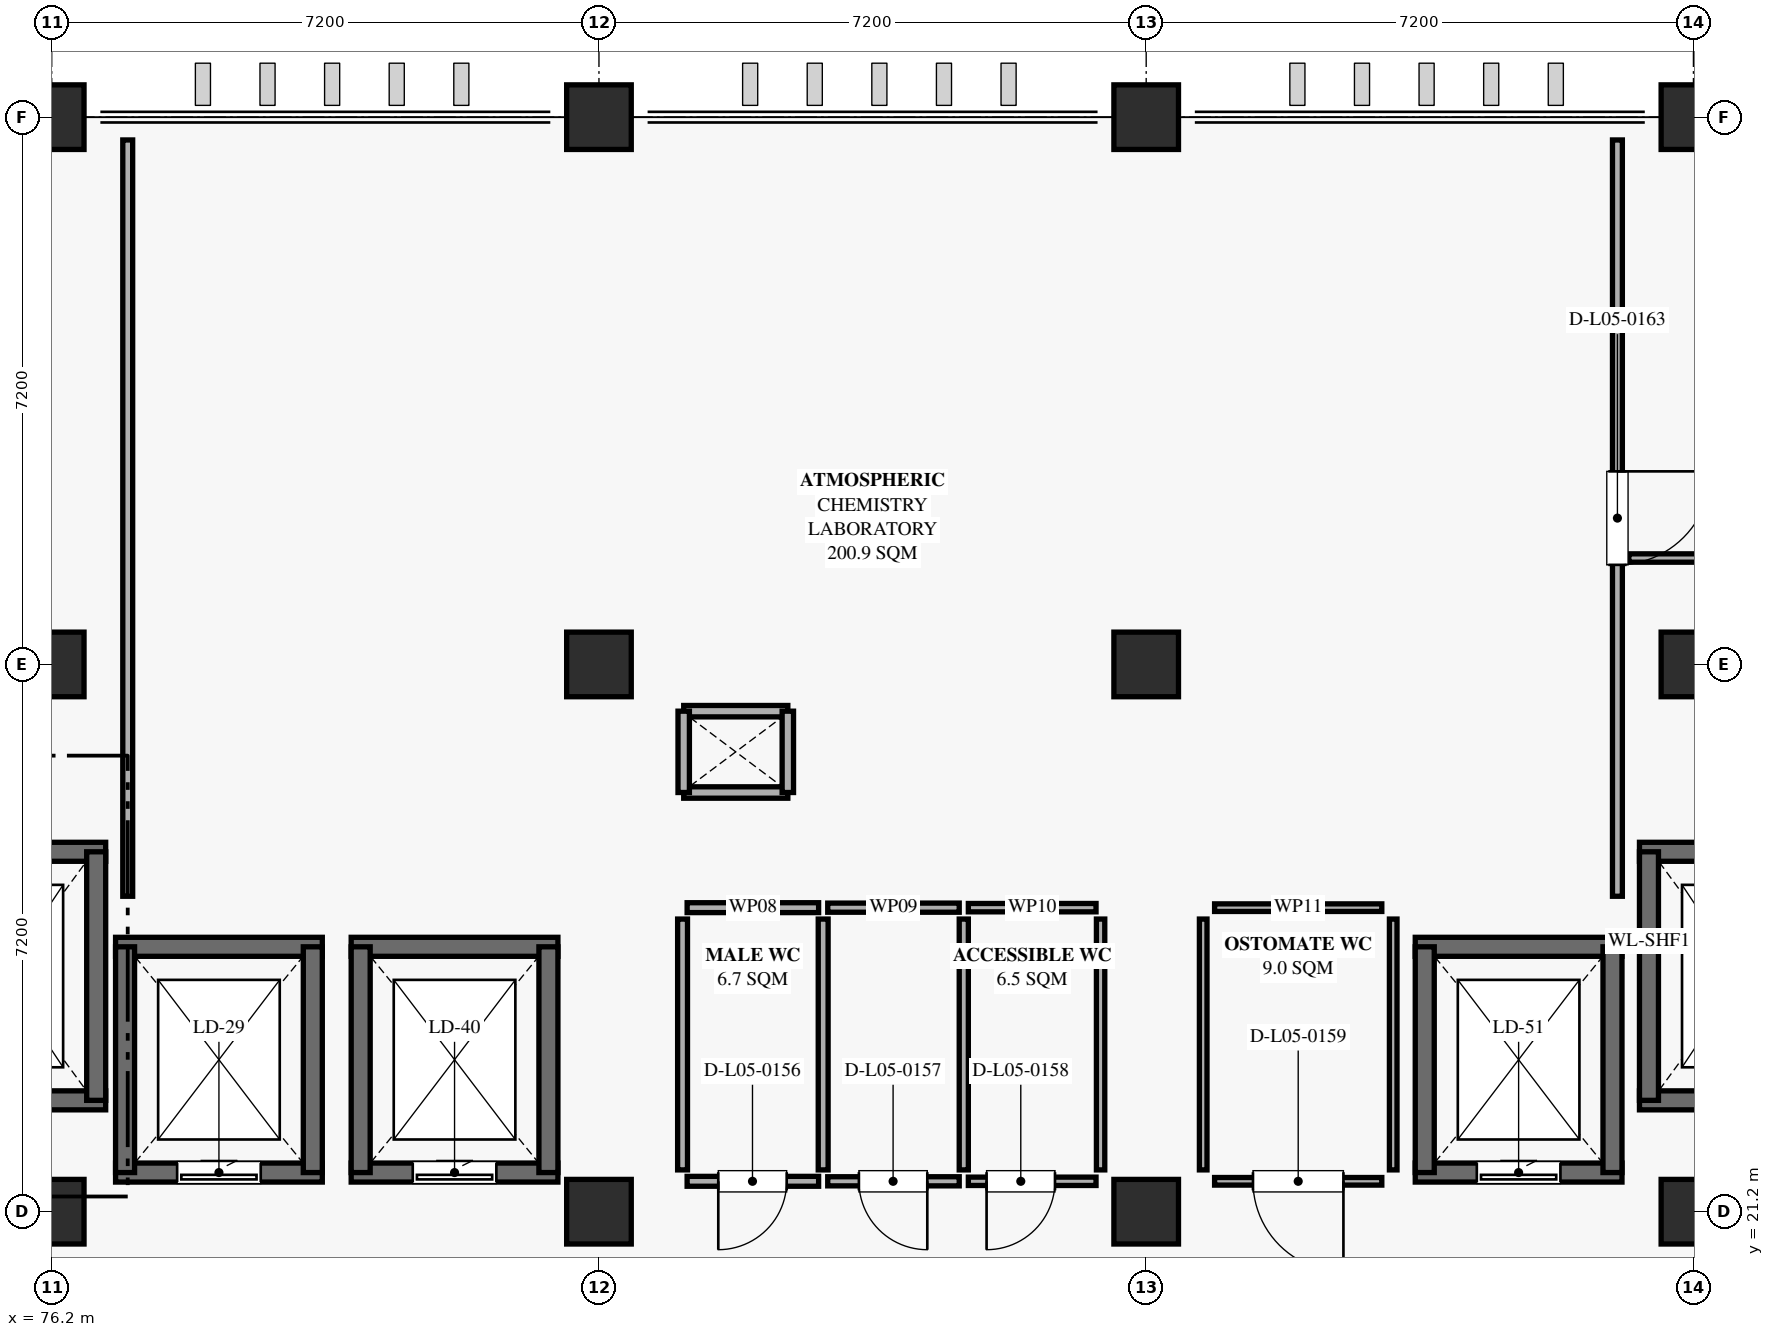
"""IFC4 building model, lengths in metres.
Left out: names, types, materials, properties, quantities, classifications, styles, units other than length and angle.
Written with IfcOpenShell. Run it as: python <this file> out.ifc"""

import sys

from ifc_helpers import new_model, si_unit, direction, frame, frame_2d, origin, origin_2d, place, context, subcontext, project, spatial, rectangle, extrude, element, fill, save


model = new_model("IFC4")
c1 = context("Model", 3, precision=1e-05, world=origin(), true_north=direction((0.0, 1.0)))
c2 = subcontext(c1, "Body", "Model", "MODEL_VIEW")
j1 = project(units=[si_unit("LENGTHUNIT", "METRE"), si_unit("PLANEANGLEUNIT", "RADIAN")], contexts=[c1])
p1 = place(None, origin())
s1 = spatial("IfcSite", under=j1, at=p1, CompositionType="ELEMENT")
p2 = place(p1, origin())
s2 = spatial("IfcBuilding", under=s1, at=p2, CompositionType="ELEMENT")
p3 = place(p2, frame((0.0, 0.0, 24.3)))
s3 = spatial("IfcBuildingStorey", under=s2, at=p3, CompositionType="ELEMENT", Elevation=24.3)
for number, where, z_axis, x_axis in (
    (1, (76.2, 21.2, 0.0), (0.0, 0.0, 1.0), (1.0, 0.0, 0.0)),
    (2, (83.4, 21.2, 0.0), (0.0, 0.0, 1.0), (1.0, 0.0, 0.0)),
    (3, (90.6, 21.2, 0.0), (0.0, 0.0, 1.0), (1.0, 0.0, 0.0)),
    (4, (97.8, 21.2, 0.0), (0.0, 0.0, 1.0), (1.0, 0.0, 0.0)),
    (5, (76.2, 28.4, 0.0), (0.0, 0.0, 1.0), (1.0, 0.0, 0.0)),
    (6, (83.4, 28.4, 0.0), (0.0, 0.0, 1.0), (1.0, 0.0, 0.0)),
    (7, (90.6, 28.4, 0.0), (0.0, 0.0, 1.0), (1.0, 0.0, 0.0)),
    (8, (97.8, 28.4, 0.0), (0.0, 0.0, 1.0), (1.0, 0.0, 0.0)),
    (9, (76.2, 35.6, 0.0), (0.0, 0.0, 1.0), (1.0, 0.0, 0.0)),
    (10, (83.4, 35.6, 0.0), (0.0, 0.0, 1.0), (1.0, 0.0, 0.0)),
    (11, (90.6, 35.6, 0.0), (0.0, 0.0, 1.0), (1.0, 0.0, 0.0)),
    (12, (97.8, 35.6, 0.0), (0.0, 0.0, 1.0), (1.0, 0.0, 0.0)),
):
    element("IfcColumn", number, at=place(p3, frame(where, z_axis=z_axis, x_axis=x_axis)), inside=s3, PredefinedType="COLUMN", context=c2, shape_type="SweptSolid", body=[
        extrude(rectangle(XDim=0.85, YDim=0.85, at=origin_2d()), origin(), (0.0, 0.0, 1.0), 4.5),
    ])
for number, where, z_axis, x_axis in (
    (13, (85.885, 26.715, 0.0), (0.0, 0.0, 1.0), (-1.0, 0.0, 0.0)),
    (14, (84.515, 27.785, 0.0), (0.0, 0.0, 1.0), (1.0, 0.0, 0.0)),
):
    element("IfcWall", number, at=place(p3, frame(where, z_axis=z_axis, x_axis=x_axis)), inside=s3, PredefinedType="PARTITIONING", context=c2, shape_type="SweptSolid", body=[
        extrude(rectangle(XDim=1.37, YDim=0.15, at=frame_2d((0.685, 0.0))), origin(), (0.0, 0.0, 1.0), 2.98),
    ])
for number, where, z_axis, x_axis in (
    (15, (84.515, 26.715, 0.0), (0.0, 0.0, 1.0), (0.0, 1.0, 0.0)),
    (16, (85.885, 27.785, 0.0), (0.0, 0.0, 1.0), (0.0, -1.0, 0.0)),
):
    element("IfcWall", number, at=place(p3, frame(where, z_axis=z_axis, x_axis=x_axis)), inside=s3, PredefinedType="PARTITIONING", context=c2, shape_type="SweptSolid", body=[
        extrude(rectangle(XDim=1.07, YDim=0.15, at=frame_2d((0.535, 0.0))), origin(), (0.0, 0.0, 1.0), 2.98),
    ])
for number, where, z_axis, x_axis in (
    (17, (76.91, 22.665, 0.0), (0.0, 0.0, 1.0), (-1.0, 0.0, 0.0)),
    (18, (74.19, 25.935, 0.0), (0.0, 0.0, 1.0), (1.0, 0.0, 0.0)),
):
    element("IfcWall", number, at=place(p3, frame(where, z_axis=z_axis, x_axis=x_axis)), inside=s3, PredefinedType="SHEAR", context=c2, shape_type="SweptSolid", body=[
        extrude(rectangle(XDim=2.72, YDim=0.25, at=frame_2d((1.36, 0.0))), origin(), (0.0, 0.0, 1.0), 4.23),
    ])
p4 = place(p3, frame((76.785, 25.935, 0.0), z_axis=(0.0, 0.0, 1.0), x_axis=(0.0, -1.0, 0.0)))
e19 = element("IfcWall", 19, at=p4, inside=s3, PredefinedType="SHEAR", context=c2, shape_type="SweptSolid", body=[
    extrude(rectangle(XDim=3.27, YDim=0.25, at=frame_2d((1.635, 0.0))), origin(), (0.0, 0.0, 1.0), 4.23),
])
for number, where, z_axis, x_axis in (
    (20, (99.81, 22.665, 0.0), (0.0, 0.0, 1.0), (-1.0, 0.0, 0.0)),
    (21, (97.09, 25.935, 0.0), (0.0, 0.0, 1.0), (1.0, 0.0, 0.0)),
):
    element("IfcWall", number, at=place(p3, frame(where, z_axis=z_axis, x_axis=x_axis)), inside=s3, PredefinedType="SHEAR", context=c2, shape_type="SweptSolid", body=[
        extrude(rectangle(XDim=2.72, YDim=0.25, at=frame_2d((1.36, 0.0))), origin(), (0.0, 0.0, 1.0), 4.23),
    ])
p5 = place(p3, frame((97.215, 22.665, 0.0), z_axis=(0.0, 0.0, 1.0), x_axis=(0.0, 1.0, 0.0)))
e22 = element("IfcWall", 22, at=p5, inside=s3, PredefinedType="SHEAR", context=c2, shape_type="SweptSolid", body=[
    extrude(rectangle(XDim=3.27, YDim=0.25, at=frame_2d((1.635, 0.0))), origin(), (0.0, 0.0, 1.0), 4.23),
])
p6 = place(p3, frame((79.76, 21.715, 0.0), z_axis=(0.0, 0.0, 1.0), x_axis=(-1.0, 0.0, 0.0)))
e23 = element("IfcWall", 23, at=p6, inside=s3, PredefinedType="SHEAR", context=c2, shape_type="SweptSolid", body=[
    extrude(rectangle(XDim=2.72, YDim=0.25, at=frame_2d((1.36, 0.0))), origin(), (0.0, 0.0, 1.0), 4.23),
])
p7 = place(p6, frame((0.81, 0.0, 0.0)))
e24 = element("IfcOpeningElement", 24, at=p7, cuts=e23, PredefinedType="OPENING", context=c2, shape_type="SweptSolid", body=[
    extrude(rectangle(XDim=1.1, YDim=2.2, at=frame_2d((0.55, 1.1))), frame((0.0, 0.135, 0.0), z_axis=(0.0, -1.0, 0.0), x_axis=(1.0, 0.0, 0.0)), (0.0, 0.0, 1.0), 0.27),
])
p8 = place(p3, frame((77.04, 24.685, 0.0), z_axis=(0.0, 0.0, 1.0), x_axis=(1.0, 0.0, 0.0)))
e25 = element("IfcWall", 25, at=p8, inside=s3, PredefinedType="SHEAR", context=c2, shape_type="SweptSolid", body=[
    extrude(rectangle(XDim=2.72, YDim=0.25, at=frame_2d((1.36, 0.0))), origin(), (0.0, 0.0, 1.0), 4.23),
])
for number, where, z_axis, x_axis in (
    (26, (77.165, 21.715, 0.0), (0.0, 0.0, 1.0), (0.0, 1.0, 0.0)),
    (27, (79.635, 24.685, 0.0), (0.0, 0.0, 1.0), (0.0, -1.0, 0.0)),
):
    element("IfcWall", number, at=place(p3, frame(where, z_axis=z_axis, x_axis=x_axis)), inside=s3, PredefinedType="SHEAR", context=c2, shape_type="SweptSolid", body=[
        extrude(rectangle(XDim=2.97, YDim=0.25, at=frame_2d((1.485, 0.0))), origin(), (0.0, 0.0, 1.0), 4.23),
    ])
p9 = place(p3, frame((82.86, 21.715, 0.0), z_axis=(0.0, 0.0, 1.0), x_axis=(-1.0, 0.0, 0.0)))
e28 = element("IfcWall", 28, at=p9, inside=s3, PredefinedType="SHEAR", context=c2, shape_type="SweptSolid", body=[
    extrude(rectangle(XDim=2.72, YDim=0.25, at=frame_2d((1.36, 0.0))), origin(), (0.0, 0.0, 1.0), 4.23),
])
p10 = place(p9, frame((0.81, 0.0, 0.0)))
e29 = element("IfcOpeningElement", 29, at=p10, cuts=e28, PredefinedType="OPENING", context=c2, shape_type="SweptSolid", body=[
    extrude(rectangle(XDim=1.1, YDim=2.2, at=frame_2d((0.55, 1.1))), frame((0.0, 0.135, 0.0), z_axis=(0.0, -1.0, 0.0), x_axis=(1.0, 0.0, 0.0)), (0.0, 0.0, 1.0), 0.27),
])
p11 = place(p3, frame((80.14, 24.685, 0.0), z_axis=(0.0, 0.0, 1.0), x_axis=(1.0, 0.0, 0.0)))
e30 = element("IfcWall", 30, at=p11, inside=s3, PredefinedType="SHEAR", context=c2, shape_type="SweptSolid", body=[
    extrude(rectangle(XDim=2.72, YDim=0.25, at=frame_2d((1.36, 0.0))), origin(), (0.0, 0.0, 1.0), 4.23),
])
for number, where, z_axis, x_axis in (
    (31, (80.265, 21.715, 0.0), (0.0, 0.0, 1.0), (0.0, 1.0, 0.0)),
    (32, (82.735, 24.685, 0.0), (0.0, 0.0, 1.0), (0.0, -1.0, 0.0)),
):
    element("IfcWall", number, at=place(p3, frame(where, z_axis=z_axis, x_axis=x_axis)), inside=s3, PredefinedType="SHEAR", context=c2, shape_type="SweptSolid", body=[
        extrude(rectangle(XDim=2.97, YDim=0.25, at=frame_2d((1.485, 0.0))), origin(), (0.0, 0.0, 1.0), 4.23),
    ])
p12 = place(p3, frame((96.86, 21.715, 0.0), z_axis=(0.0, 0.0, 1.0), x_axis=(-1.0, 0.0, 0.0)))
e33 = element("IfcWall", 33, at=p12, inside=s3, PredefinedType="SHEAR", context=c2, shape_type="SweptSolid", body=[
    extrude(rectangle(XDim=2.72, YDim=0.25, at=frame_2d((1.36, 0.0))), origin(), (0.0, 0.0, 1.0), 4.23),
])
p13 = place(p12, frame((0.81, 0.0, 0.0)))
e34 = element("IfcOpeningElement", 34, at=p13, cuts=e33, PredefinedType="OPENING", context=c2, shape_type="SweptSolid", body=[
    extrude(rectangle(XDim=1.1, YDim=2.2, at=frame_2d((0.55, 1.1))), frame((0.0, 0.135, 0.0), z_axis=(0.0, -1.0, 0.0), x_axis=(1.0, 0.0, 0.0)), (0.0, 0.0, 1.0), 0.27),
])
p14 = place(p3, frame((94.14, 24.685, 0.0), z_axis=(0.0, 0.0, 1.0), x_axis=(1.0, 0.0, 0.0)))
e35 = element("IfcWall", 35, at=p14, inside=s3, PredefinedType="SHEAR", context=c2, shape_type="SweptSolid", body=[
    extrude(rectangle(XDim=2.72, YDim=0.25, at=frame_2d((1.36, 0.0))), origin(), (0.0, 0.0, 1.0), 4.23),
])
for number, where, z_axis, x_axis in (
    (36, (94.265, 21.715, 0.0), (0.0, 0.0, 1.0), (0.0, 1.0, 0.0)),
    (37, (96.735, 24.685, 0.0), (0.0, 0.0, 1.0), (0.0, -1.0, 0.0)),
):
    element("IfcWall", number, at=place(p3, frame(where, z_axis=z_axis, x_axis=x_axis)), inside=s3, PredefinedType="SHEAR", context=c2, shape_type="SweptSolid", body=[
        extrude(rectangle(XDim=2.97, YDim=0.25, at=frame_2d((1.485, 0.0))), origin(), (0.0, 0.0, 1.0), 4.23),
    ])
p15 = place(p3, frame((86.29, 21.6, 0.0), z_axis=(0.0, 0.0, 1.0), x_axis=(-1.0, 0.0, 0.0)))
e38 = element("IfcWall", 38, at=p15, inside=s3, PredefinedType="PARTITIONING", context=c2, shape_type="SweptSolid", body=[
    extrude(rectangle(XDim=1.73, YDim=0.13, at=frame_2d((0.865, 0.0))), origin(), (0.0, 0.0, 1.0), 2.98),
])
p16 = place(p15, frame((0.42, 0.0, 0.0)))
e39 = element("IfcOpeningElement", 39, at=p16, cuts=e38, PredefinedType="OPENING", context=c2, shape_type="SweptSolid", body=[
    extrude(rectangle(XDim=0.9, YDim=2.1, at=frame_2d((0.45, 1.05))), frame((0.0, 0.075, 0.0), z_axis=(0.0, -1.0, 0.0), x_axis=(1.0, 0.0, 0.0)), (0.0, 0.0, 1.0), 0.15),
])
p17 = place(p3, frame((84.56, 25.2, 0.0), z_axis=(0.0, 0.0, 1.0), x_axis=(1.0, 0.0, 0.0)))
e40 = element("IfcWall", 40, at=p17, inside=s3, PredefinedType="PARTITIONING", context=c2, shape_type="SweptSolid", body=[
    extrude(rectangle(XDim=1.73, YDim=0.13, at=frame_2d((0.865, 0.0))), origin(), (0.0, 0.0, 1.0), 2.98),
])
for number, where, z_axis, x_axis in (
    (41, (84.5, 21.75, 0.0), (0.0, 0.0, 1.0), (0.0, 1.0, 0.0)),
    (42, (86.35, 25.05, 0.0), (0.0, 0.0, 1.0), (0.0, -1.0, 0.0)),
):
    element("IfcWall", number, at=place(p3, frame(where, z_axis=z_axis, x_axis=x_axis)), inside=s3, PredefinedType="PARTITIONING", context=c2, shape_type="SweptSolid", body=[
        extrude(rectangle(XDim=3.3, YDim=0.13, at=frame_2d((1.65, 0.0))), origin(), (0.0, 0.0, 1.0), 2.98),
    ])
p18 = place(p3, frame((88.14, 21.6, 0.0), z_axis=(0.0, 0.0, 1.0), x_axis=(-1.0, 0.0, 0.0)))
e43 = element("IfcWall", 43, at=p18, inside=s3, PredefinedType="PARTITIONING", context=c2, shape_type="SweptSolid", body=[
    extrude(rectangle(XDim=1.73, YDim=0.12, at=frame_2d((0.865, 0.0))), origin(), (0.0, 0.0, 1.0), 2.98),
])
p19 = place(p18, frame((0.42, 0.0, 0.0)))
e44 = element("IfcOpeningElement", 44, at=p19, cuts=e43, PredefinedType="OPENING", context=c2, shape_type="SweptSolid", body=[
    extrude(rectangle(XDim=0.9, YDim=2.16, at=frame_2d((0.45, 1.08))), frame((0.0, 0.07, 0.0), z_axis=(0.0, -1.0, 0.0), x_axis=(1.0, 0.0, 0.0)), (0.0, 0.0, 1.0), 0.14),
])
p20 = place(p3, frame((86.41, 25.2, 0.0), z_axis=(0.0, 0.0, 1.0), x_axis=(1.0, 0.0, 0.0)))
e45 = element("IfcWall", 45, at=p20, inside=s3, PredefinedType="PARTITIONING", context=c2, shape_type="SweptSolid", body=[
    extrude(rectangle(XDim=1.73, YDim=0.12, at=frame_2d((0.865, 0.0))), origin(), (0.0, 0.0, 1.0), 2.98),
])
p21 = place(p3, frame((88.2, 25.05, 0.0), z_axis=(0.0, 0.0, 1.0), x_axis=(0.0, -1.0, 0.0)))
e46 = element("IfcWall", 46, at=p21, inside=s3, PredefinedType="PARTITIONING", context=c2, shape_type="SweptSolid", body=[
    extrude(rectangle(XDim=3.3, YDim=0.12, at=frame_2d((1.65, 0.0))), origin(), (0.0, 0.0, 1.0), 2.98),
])
p22 = place(p3, frame((89.94, 21.6, 0.0), z_axis=(0.0, 0.0, 1.0), x_axis=(-1.0, 0.0, 0.0)))
e47 = element("IfcWall", 47, at=p22, inside=s3, PredefinedType="PARTITIONING", context=c2, shape_type="SweptSolid", body=[
    extrude(rectangle(XDim=1.68, YDim=0.11, at=frame_2d((0.84, 0.0))), origin(), (0.0, 0.0, 1.0), 2.98),
])
p23 = place(p22, frame((0.54, 0.0, 0.0)))
e48 = element("IfcOpeningElement", 48, at=p23, cuts=e47, PredefinedType="OPENING", context=c2, shape_type="SweptSolid", body=[
    extrude(rectangle(XDim=0.9, YDim=2.22, at=frame_2d((0.45, 1.11))), frame((0.0, 0.065, 0.0), z_axis=(0.0, -1.0, 0.0), x_axis=(1.0, 0.0, 0.0)), (0.0, 0.0, 1.0), 0.13),
])
p24 = place(p3, frame((88.26, 25.2, 0.0), z_axis=(0.0, 0.0, 1.0), x_axis=(1.0, 0.0, 0.0)))
e49 = element("IfcWall", 49, at=p24, inside=s3, PredefinedType="PARTITIONING", context=c2, shape_type="SweptSolid", body=[
    extrude(rectangle(XDim=1.68, YDim=0.11, at=frame_2d((0.84, 0.0))), origin(), (0.0, 0.0, 1.0), 2.98),
])
p25 = place(p3, frame((90.0, 25.05, 0.0), z_axis=(0.0, 0.0, 1.0), x_axis=(0.0, -1.0, 0.0)))
e50 = element("IfcWall", 50, at=p25, inside=s3, PredefinedType="PARTITIONING", context=c2, shape_type="SweptSolid", body=[
    extrude(rectangle(XDim=3.3, YDim=0.11, at=frame_2d((1.65, 0.0))), origin(), (0.0, 0.0, 1.0), 2.98),
])
p26 = place(p3, frame((93.7, 21.6, 0.0), z_axis=(0.0, 0.0, 1.0), x_axis=(-1.0, 0.0, 0.0)))
e51 = element("IfcWall", 51, at=p26, inside=s3, PredefinedType="PARTITIONING", context=c2, shape_type="SweptSolid", body=[
    extrude(rectangle(XDim=2.2, YDim=0.1, at=frame_2d((1.1, 0.0))), origin(), (0.0, 0.0, 1.0), 2.98),
])
p27 = place(p26, frame((0.505, 0.0, 0.0)))
e52 = element("IfcOpeningElement", 52, at=p27, cuts=e51, PredefinedType="OPENING", context=c2, shape_type="SweptSolid", body=[
    extrude(rectangle(XDim=1.19, YDim=2.05, at=frame_2d((0.595, 1.025))), frame((0.0, 0.06, 0.0), z_axis=(0.0, -1.0, 0.0), x_axis=(1.0, 0.0, 0.0)), (0.0, 0.0, 1.0), 0.12),
])
p28 = place(p3, frame((91.5, 25.2, 0.0), z_axis=(0.0, 0.0, 1.0), x_axis=(1.0, 0.0, 0.0)))
e53 = element("IfcWall", 53, at=p28, inside=s3, PredefinedType="PARTITIONING", context=c2, shape_type="SweptSolid", body=[
    extrude(rectangle(XDim=2.2, YDim=0.1, at=frame_2d((1.1, 0.0))), origin(), (0.0, 0.0, 1.0), 2.98),
])
for number, where, z_axis, x_axis in (
    (54, (91.35, 21.75, 0.0), (0.0, 0.0, 1.0), (0.0, 1.0, 0.0)),
    (55, (93.85, 25.05, 0.0), (0.0, 0.0, 1.0), (0.0, -1.0, 0.0)),
):
    element("IfcWall", number, at=place(p3, frame(where, z_axis=z_axis, x_axis=x_axis)), inside=s3, PredefinedType="PARTITIONING", context=c2, shape_type="SweptSolid", body=[
        extrude(rectangle(XDim=3.3, YDim=0.1, at=frame_2d((1.65, 0.0))), origin(), (0.0, 0.0, 1.0), 2.98),
    ])
p29 = place(p3, frame((77.2, 25.35, 0.0), z_axis=(0.0, 0.0, 1.0), x_axis=(0.0, 1.0, 0.0)))
e56 = element("IfcWall", 56, at=p29, inside=s3, PredefinedType="PARTITIONING", context=c2, shape_type="SweptSolid", body=[
    extrude(rectangle(XDim=9.95, YDim=0.13, at=frame_2d((4.975, 0.0))), origin(), (0.0, 0.0, 1.0), 2.98),
])
p30 = place(p3, frame((96.8, 35.3, 0.0), z_axis=(0.0, 0.0, 1.0), x_axis=(0.0, -1.0, 0.0)))
e57 = element("IfcWall", 57, at=p30, inside=s3, PredefinedType="PARTITIONING", context=c2, shape_type="SweptSolid", body=[
    extrude(rectangle(XDim=9.95, YDim=0.13, at=frame_2d((4.975, 0.0))), origin(), (0.0, 0.0, 1.0), 2.98),
])
p31 = place(p30, frame((4.36, 0.0, 0.0)))
e58 = element("IfcOpeningElement", 58, at=p31, cuts=e57, PredefinedType="OPENING", context=c2, shape_type="SweptSolid", body=[
    extrude(rectangle(XDim=1.23, YDim=2.05, at=frame_2d((0.615, 1.025))), frame((0.0, 0.075, 0.0), z_axis=(0.0, -1.0, 0.0), x_axis=(1.0, 0.0, 0.0)), (0.0, 0.0, 1.0), 0.15),
])
p32 = place(p3, frame((111.03, 29.8, 0.0), z_axis=(0.0, 0.0, 1.0), x_axis=(-1.0, 0.0, 0.0)))
e59 = element("IfcWall", 59, at=p32, inside=s3, PredefinedType="PARTITIONING", context=c2, shape_type="SweptSolid", body=[
    extrude(rectangle(XDim=14.08, YDim=0.11, at=frame_2d((7.04, 0.0))), origin(), (0.0, 0.0, 1.0), 2.98),
])
p33 = place(p32, frame((9.015, 0.0, 0.0)))
e60 = element("IfcOpeningElement", 60, at=p33, cuts=e59, PredefinedType="OPENING", context=c2, shape_type="SweptSolid", body=[
    extrude(rectangle(XDim=1.23, YDim=2.1, at=frame_2d((0.615, 1.05))), frame((0.0, 0.065, 0.0), z_axis=(0.0, -1.0, 0.0), x_axis=(1.0, 0.0, 0.0)), (0.0, 0.0, 1.0), 0.13),
])
p34 = place(p7, origin())
e61 = element("IfcDoor", 61, at=p34, inside=s3, OperationType="SLIDING_TO_LEFT", PredefinedType="DOOR", context=c2, shape_type="SweptSolid", body=[
    extrude(rectangle(XDim=1.1, YDim=2.2, at=frame_2d((0.55, 1.1))), frame((0.0, 0.025, 0.0), z_axis=(0.0, -1.0, 0.0), x_axis=(1.0, 0.0, 0.0)), (0.0, 0.0, 1.0), 0.05),
])
fill(e24, e61)
p35 = place(p10, origin())
e62 = element("IfcDoor", 62, at=p35, inside=s3, OperationType="SLIDING_TO_LEFT", PredefinedType="DOOR", context=c2, shape_type="SweptSolid", body=[
    extrude(rectangle(XDim=1.1, YDim=2.2, at=frame_2d((0.55, 1.1))), frame((0.0, 0.025, 0.0), z_axis=(0.0, -1.0, 0.0), x_axis=(1.0, 0.0, 0.0)), (0.0, 0.0, 1.0), 0.05),
])
fill(e29, e62)
p36 = place(p13, origin())
e63 = element("IfcDoor", 63, at=p36, inside=s3, OperationType="SLIDING_TO_LEFT", PredefinedType="DOOR", context=c2, shape_type="SweptSolid", body=[
    extrude(rectangle(XDim=1.1, YDim=2.2, at=frame_2d((0.55, 1.1))), frame((0.0, 0.025, 0.0), z_axis=(0.0, -1.0, 0.0), x_axis=(1.0, 0.0, 0.0)), (0.0, 0.0, 1.0), 0.05),
])
fill(e34, e63)
p37 = place(p16, origin())
e64 = element("IfcDoor", 64, at=p37, inside=s3, OperationType="SINGLE_SWING_RIGHT", PredefinedType="DOOR", context=c2, shape_type="SweptSolid", body=[
    extrude(rectangle(XDim=0.9, YDim=2.1, at=frame_2d((0.45, 1.05))), frame((0.0, 0.025, 0.0), z_axis=(0.0, -1.0, 0.0), x_axis=(1.0, 0.0, 0.0)), (0.0, 0.0, 1.0), 0.05),
])
fill(e39, e64)
p38 = place(p19, origin())
e65 = element("IfcDoor", 65, at=p38, inside=s3, OperationType="SINGLE_SWING_LEFT", PredefinedType="DOOR", context=c2, shape_type="SweptSolid", body=[
    extrude(rectangle(XDim=0.9, YDim=2.16, at=frame_2d((0.45, 1.08))), frame((0.0, 0.025, 0.0), z_axis=(0.0, -1.0, 0.0), x_axis=(1.0, 0.0, 0.0)), (0.0, 0.0, 1.0), 0.05),
])
fill(e44, e65)
p39 = place(p23, origin())
e66 = element("IfcDoor", 66, at=p39, inside=s3, OperationType="SINGLE_SWING_RIGHT", PredefinedType="DOOR", context=c2, shape_type="SweptSolid", body=[
    extrude(rectangle(XDim=0.9, YDim=2.22, at=frame_2d((0.45, 1.11))), frame((0.0, 0.025, 0.0), z_axis=(0.0, -1.0, 0.0), x_axis=(1.0, 0.0, 0.0)), (0.0, 0.0, 1.0), 0.05),
])
fill(e48, e66)
p40 = place(p27, origin())
e67 = element("IfcDoor", 67, at=p40, inside=s3, OperationType="SINGLE_SWING_LEFT", PredefinedType="DOOR", context=c2, shape_type="SweptSolid", body=[
    extrude(rectangle(XDim=1.19, YDim=2.05, at=frame_2d((0.595, 1.025))), frame((0.0, 0.025, 0.0), z_axis=(0.0, -1.0, 0.0), x_axis=(1.0, 0.0, 0.0)), (0.0, 0.0, 1.0), 0.05),
])
fill(e52, e67)
p41 = place(p31, origin())
e68 = element("IfcDoor", 68, at=p41, inside=s3, OperationType="SINGLE_SWING_LEFT", PredefinedType="DOOR", context=c2, shape_type="SweptSolid", body=[
    extrude(rectangle(XDim=1.23, YDim=2.05, at=frame_2d((0.615, 1.025))), frame((0.0, 0.025, 0.0), z_axis=(0.0, -1.0, 0.0), x_axis=(1.0, 0.0, 0.0)), (0.0, 0.0, 1.0), 0.05),
])
fill(e58, e68)
save(model, sys.argv[1])
